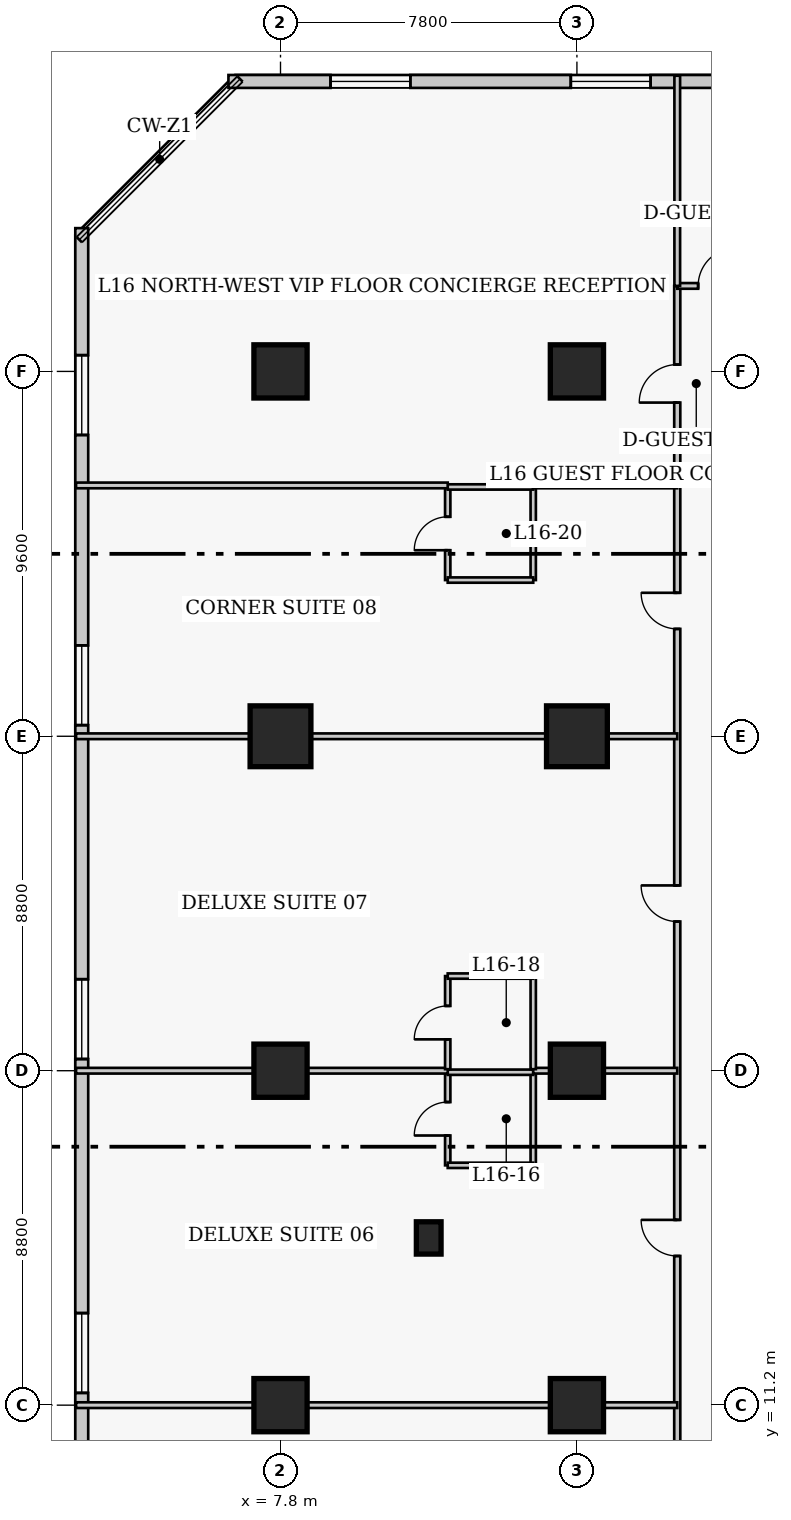
"""IFC4 building model, lengths in metres.
Left out: names, types, materials, properties, quantities, classifications, styles, units other than length and angle.
Written with IfcOpenShell. Run it as: python <this file> out.ifc"""

import sys

from ifc_helpers import new_model, si_unit, direction, frame, frame_2d, origin, origin_2d, place, context, subcontext, project, spatial, rectangle, extrude, element, fill, save


model = new_model("IFC4")
c1 = context("Model", 3, precision=1e-05, world=origin(), true_north=direction((0.0, 1.0)))
c2 = subcontext(c1, "Body", "Model", "MODEL_VIEW")
j1 = project(units=[si_unit("LENGTHUNIT", "METRE"), si_unit("PLANEANGLEUNIT", "RADIAN")], contexts=[c1])
p1 = place(None, origin())
s1 = spatial("IfcSite", under=j1, at=p1, CompositionType="ELEMENT")
p2 = place(p1, origin())
s2 = spatial("IfcBuilding", under=s1, at=p2, CompositionType="ELEMENT")
p3 = place(p2, frame((0.0, 0.0, 67.8)))
s3 = spatial("IfcBuildingStorey", under=s2, at=p3, CompositionType="ELEMENT", Elevation=67.8)
for number, where, z_axis, x_axis in (
    (1, (7.8, 11.2, 0.0), (0.0, 0.0, 1.0), (1.0, 0.0, 0.0)),
    (2, (7.8, 20.0, 0.0), (0.0, 0.0, 1.0), (1.0, 0.0, 0.0)),
):
    element("IfcColumn", number, at=place(p3, frame(where, z_axis=z_axis, x_axis=x_axis)), inside=s3, PredefinedType="COLUMN", context=c2, shape_type="SweptSolid", body=[
        extrude(rectangle(XDim=1.4, YDim=1.4, at=origin_2d()), origin(), (0.0, 0.0, 1.0), 3.8),
    ])
p4 = place(p3, frame((7.8, 28.8, 0.0), z_axis=(0.0, 0.0, 1.0), x_axis=(1.0, 0.0, 0.0)))
e3 = element("IfcColumn", 3, at=p4, inside=s3, PredefinedType="COLUMN", context=c2, shape_type="SweptSolid", body=[
    extrude(rectangle(XDim=1.6, YDim=1.6, at=origin_2d()), origin(), (0.0, 0.0, 1.0), 3.8),
])
for number, where, z_axis, x_axis in (
    (4, (7.8, 38.4, 0.0), (0.0, 0.0, 1.0), (1.0, 0.0, 0.0)),
    (5, (15.6, 11.2, 0.0), (0.0, 0.0, 1.0), (1.0, 0.0, 0.0)),
    (6, (15.6, 20.0, 0.0), (0.0, 0.0, 1.0), (1.0, 0.0, 0.0)),
):
    element("IfcColumn", number, at=place(p3, frame(where, z_axis=z_axis, x_axis=x_axis)), inside=s3, PredefinedType="COLUMN", context=c2, shape_type="SweptSolid", body=[
        extrude(rectangle(XDim=1.4, YDim=1.4, at=origin_2d()), origin(), (0.0, 0.0, 1.0), 3.8),
    ])
p5 = place(p3, frame((15.6, 28.8, 0.0), z_axis=(0.0, 0.0, 1.0), x_axis=(1.0, 0.0, 0.0)))
e7 = element("IfcColumn", 7, at=p5, inside=s3, PredefinedType="COLUMN", context=c2, shape_type="SweptSolid", body=[
    extrude(rectangle(XDim=1.6, YDim=1.6, at=origin_2d()), origin(), (0.0, 0.0, 1.0), 3.8),
])
p6 = place(p3, frame((15.6, 38.4, 0.0), z_axis=(0.0, 0.0, 1.0), x_axis=(1.0, 0.0, 0.0)))
e8 = element("IfcColumn", 8, at=p6, inside=s3, PredefinedType="COLUMN", context=c2, shape_type="SweptSolid", body=[
    extrude(rectangle(XDim=1.4, YDim=1.4, at=origin_2d()), origin(), (0.0, 0.0, 1.0), 3.8),
])
p7 = place(p3, frame((11.7, 15.6, 0.0), z_axis=(0.0, 0.0, 1.0), x_axis=(1.0, 0.0, 0.0)))
e9 = element("IfcColumn", 9, at=p7, inside=s3, PredefinedType="PILASTER", context=c2, shape_type="SweptSolid", body=[
    extrude(rectangle(XDim=0.65, YDim=0.85, at=origin_2d()), origin(), (0.0, 0.0, 1.0), 3.8),
])
p8 = place(p3, frame((36.32, 46.03, 0.0), z_axis=(0.0, 0.0, 1.0), x_axis=(-1.0, 0.0, 0.0)))
e10 = element("IfcWall", 10, at=p8, inside=s3, PredefinedType="SOLIDWALL", context=c2, shape_type="SweptSolid", body=[
    extrude(rectangle(XDim=29.89, YDim=0.34, at=frame_2d((14.945, 0.0))), origin(), (0.0, 0.0, 1.0), 3.54),
])
p9 = place(p8, frame((2.686, 0.0, 0.85)))
e11 = element("IfcOpeningElement", 11, at=p9, cuts=e10, PredefinedType="OPENING", context=c2, shape_type="SweptSolid", body=[
    extrude(rectangle(XDim=2.1, YDim=1.85, at=frame_2d((1.05, 0.925))), frame((0.0, 0.18, 0.0), z_axis=(0.0, -1.0, 0.0), x_axis=(1.0, 0.0, 0.0)), (0.0, 0.0, 1.0), 0.36),
])
p10 = place(p8, frame((10.159, 0.0, 0.85)))
e12 = element("IfcOpeningElement", 12, at=p10, cuts=e10, PredefinedType="OPENING", context=c2, shape_type="SweptSolid", body=[
    extrude(rectangle(XDim=2.1, YDim=1.85, at=frame_2d((1.05, 0.925))), frame((0.0, 0.18, 0.0), z_axis=(0.0, -1.0, 0.0), x_axis=(1.0, 0.0, 0.0)), (0.0, 0.0, 1.0), 0.36),
])
p11 = place(p8, frame((18.781, 0.0, 0.85)))
e13 = element("IfcOpeningElement", 13, at=p11, cuts=e10, PredefinedType="OPENING", context=c2, shape_type="SweptSolid", body=[
    extrude(rectangle(XDim=2.1, YDim=1.85, at=frame_2d((1.05, 0.925))), frame((0.0, 0.18, 0.0), z_axis=(0.0, -1.0, 0.0), x_axis=(1.0, 0.0, 0.0)), (0.0, 0.0, 1.0), 0.36),
])
p12 = place(p8, frame((25.104, 0.0, 0.85)))
e14 = element("IfcOpeningElement", 14, at=p12, cuts=e10, PredefinedType="OPENING", context=c2, shape_type="SweptSolid", body=[
    extrude(rectangle(XDim=2.1, YDim=1.85, at=frame_2d((1.05, 0.925))), frame((0.0, 0.18, 0.0), z_axis=(0.0, -1.0, 0.0), x_axis=(1.0, 0.0, 0.0)), (0.0, 0.0, 1.0), 0.36),
])
p13 = place(p3, frame((2.57, 42.17, 0.0), z_axis=(0.0, 0.0, 1.0), x_axis=(0.0, -1.0, 0.0)))
e15 = element("IfcWall", 15, at=p13, inside=s3, PredefinedType="SOLIDWALL", context=c2, shape_type="SweptSolid", body=[
    extrude(rectangle(XDim=35.14, YDim=0.34, at=frame_2d((17.57, 0.0))), origin(), (0.0, 0.0, 1.0), 3.54),
])
p14 = place(p13, frame((3.343, 0.0, 0.85)))
e16 = element("IfcOpeningElement", 16, at=p14, cuts=e15, PredefinedType="OPENING", context=c2, shape_type="SweptSolid", body=[
    extrude(rectangle(XDim=2.1, YDim=1.85, at=frame_2d((1.05, 0.925))), frame((0.0, 0.18, 0.0), z_axis=(0.0, -1.0, 0.0), x_axis=(1.0, 0.0, 0.0)), (0.0, 0.0, 1.0), 0.36),
])
p15 = place(p13, frame((10.978, 0.0, 0.85)))
e17 = element("IfcOpeningElement", 17, at=p15, cuts=e15, PredefinedType="OPENING", context=c2, shape_type="SweptSolid", body=[
    extrude(rectangle(XDim=2.1, YDim=1.85, at=frame_2d((1.05, 0.925))), frame((0.0, 0.18, 0.0), z_axis=(0.0, -1.0, 0.0), x_axis=(1.0, 0.0, 0.0)), (0.0, 0.0, 1.0), 0.36),
])
p16 = place(p13, frame((19.762, 0.0, 0.85)))
e18 = element("IfcOpeningElement", 18, at=p16, cuts=e15, PredefinedType="OPENING", context=c2, shape_type="SweptSolid", body=[
    extrude(rectangle(XDim=2.1, YDim=1.85, at=frame_2d((1.05, 0.925))), frame((0.0, 0.18, 0.0), z_axis=(0.0, -1.0, 0.0), x_axis=(1.0, 0.0, 0.0)), (0.0, 0.0, 1.0), 0.36),
])
p17 = place(p13, frame((28.548, 0.0, 0.85)))
e19 = element("IfcOpeningElement", 19, at=p17, cuts=e15, PredefinedType="OPENING", context=c2, shape_type="SweptSolid", body=[
    extrude(rectangle(XDim=2.1, YDim=1.85, at=frame_2d((1.05, 0.925))), frame((0.0, 0.18, 0.0), z_axis=(0.0, -1.0, 0.0), x_axis=(1.0, 0.0, 0.0)), (0.0, 0.0, 1.0), 0.36),
])
p18 = place(p3, frame((18.24, 5.05, 0.0), z_axis=(0.0, 0.0, 1.0), x_axis=(0.0, 1.0, 0.0)))
e20 = element("IfcWall", 20, at=p18, inside=s3, PredefinedType="PARTITIONING", context=c2, shape_type="SweptSolid", body=[
    extrude(rectangle(XDim=35.6, YDim=0.16, at=frame_2d((17.8, 0.0))), origin(), (0.0, 0.0, 1.0), 3.54),
])
p19 = place(p18, frame((2.6, 0.0, 0.0)))
e21 = element("IfcOpeningElement", 21, at=p19, cuts=e20, PredefinedType="OPENING", context=c2, shape_type="SweptSolid", body=[
    extrude(rectangle(XDim=0.95, YDim=2.1, at=frame_2d((0.475, 1.05))), frame((0.0, 0.09, 0.0), z_axis=(0.0, -1.0, 0.0), x_axis=(1.0, 0.0, 0.0)), (0.0, 0.0, 1.0), 0.18),
])
p20 = place(p18, frame((10.075, 0.0, 0.0)))
e22 = element("IfcOpeningElement", 22, at=p20, cuts=e20, PredefinedType="OPENING", context=c2, shape_type="SweptSolid", body=[
    extrude(rectangle(XDim=0.95, YDim=2.1, at=frame_2d((0.475, 1.05))), frame((0.0, 0.09, 0.0), z_axis=(0.0, -1.0, 0.0), x_axis=(1.0, 0.0, 0.0)), (0.0, 0.0, 1.0), 0.18),
])
p21 = place(p18, frame((18.875, 0.0, 0.0)))
e23 = element("IfcOpeningElement", 23, at=p21, cuts=e20, PredefinedType="OPENING", context=c2, shape_type="SweptSolid", body=[
    extrude(rectangle(XDim=0.95, YDim=2.1, at=frame_2d((0.475, 1.05))), frame((0.0, 0.09, 0.0), z_axis=(0.0, -1.0, 0.0), x_axis=(1.0, 0.0, 0.0)), (0.0, 0.0, 1.0), 0.18),
])
p22 = place(p18, frame((26.575, 0.0, 0.0)))
e24 = element("IfcOpeningElement", 24, at=p22, cuts=e20, PredefinedType="OPENING", context=c2, shape_type="SweptSolid", body=[
    extrude(rectangle(XDim=0.95, YDim=2.1, at=frame_2d((0.475, 1.05))), frame((0.0, 0.09, 0.0), z_axis=(0.0, -1.0, 0.0), x_axis=(1.0, 0.0, 0.0)), (0.0, 0.0, 1.0), 0.18),
])
p23 = place(p18, frame((32.53, 0.0, 0.0)))
e25 = element("IfcOpeningElement", 25, at=p23, cuts=e20, PredefinedType="OPENING", context=c2, shape_type="SweptSolid", body=[
    extrude(rectangle(XDim=1.0, YDim=2.15, at=frame_2d((0.5, 1.075))), frame((0.0, 0.09, 0.0), z_axis=(0.0, -1.0, 0.0), x_axis=(1.0, 0.0, 0.0)), (0.0, 0.0, 1.0), 0.18),
])
p24 = place(p3, frame((18.24, 40.65, 0.0), z_axis=(0.0, 0.0, 1.0), x_axis=(1.0, 0.0, 0.0)))
e26 = element("IfcWall", 26, at=p24, inside=s3, PredefinedType="PARTITIONING", context=c2, shape_type="SweptSolid", body=[
    extrude(rectangle(XDim=3.86, YDim=0.15, at=frame_2d((1.93, 0.0))), origin(), (0.0, 0.0, 1.0), 3.54),
])
p25 = place(p24, frame((0.55, 0.0, 0.0)))
e27 = element("IfcOpeningElement", 27, at=p25, cuts=e26, PredefinedType="OPENING", context=c2, shape_type="SweptSolid", body=[
    extrude(rectangle(XDim=1.0, YDim=2.15, at=frame_2d((0.5, 1.075))), frame((0.0, 0.085, 0.0), z_axis=(0.0, -1.0, 0.0), x_axis=(1.0, 0.0, 0.0)), (0.0, 0.0, 1.0), 0.17),
])
p26 = place(p3, frame((18.24, 40.65, 0.0), z_axis=(0.0, 0.0, 1.0), x_axis=(0.0, 1.0, 0.0)))
e28 = element("IfcWall", 28, at=p26, inside=s3, PredefinedType="PARTITIONING", context=c2, shape_type="SweptSolid", body=[
    extrude(rectangle(XDim=5.53, YDim=0.15, at=frame_2d((2.765, 0.0))), origin(), (0.0, 0.0, 1.0), 3.54),
])
p27 = place(p3, frame((2.42, 11.2, 0.0), z_axis=(0.0, 0.0, 1.0), x_axis=(1.0, 0.0, 0.0)))
e29 = element("IfcWall", 29, at=p27, inside=s3, PredefinedType="PARTITIONING", context=c2, shape_type="SweptSolid", body=[
    extrude(rectangle(XDim=15.82, YDim=0.15, at=frame_2d((7.91, 0.0))), origin(), (0.0, 0.0, 1.0), 2.593),
])
p28 = place(p3, frame((12.2, 17.51, 0.0), z_axis=(0.0, 0.0, 1.0), x_axis=(0.0, 1.0, 0.0)))
e30 = element("IfcWall", 30, at=p28, inside=s3, PredefinedType="PLUMBINGWALL", context=c2, shape_type="SweptSolid", body=[
    extrude(rectangle(XDim=2.45, YDim=0.14, at=frame_2d((1.225, 0.0))), origin(), (0.0, 0.0, 1.0), 3.54),
])
p29 = place(p28, frame((0.785, 0.0, 0.0)))
e31 = element("IfcOpeningElement", 31, at=p29, cuts=e30, PredefinedType="OPENING", context=c2, shape_type="SweptSolid", body=[
    extrude(rectangle(XDim=0.88, YDim=2.05, at=frame_2d((0.44, 1.025))), frame((0.0, 0.08, 0.0), z_axis=(0.0, -1.0, 0.0), x_axis=(1.0, 0.0, 0.0)), (0.0, 0.0, 1.0), 0.16),
])
p30 = place(p3, frame((14.45, 17.51, 0.0), z_axis=(0.0, 0.0, 1.0), x_axis=(0.0, 1.0, 0.0)))
e32 = element("IfcWall", 32, at=p30, inside=s3, PredefinedType="PLUMBINGWALL", context=c2, shape_type="SweptSolid", body=[
    extrude(rectangle(XDim=2.45, YDim=0.14, at=frame_2d((1.225, 0.0))), origin(), (0.0, 0.0, 1.0), 3.54),
])
p31 = place(p3, frame((12.2, 17.51, 0.0), z_axis=(0.0, 0.0, 1.0), x_axis=(1.0, 0.0, 0.0)))
e33 = element("IfcWall", 33, at=p31, inside=s3, PredefinedType="PLUMBINGWALL", context=c2, shape_type="SweptSolid", body=[
    extrude(rectangle(XDim=2.25, YDim=0.14, at=frame_2d((1.125, 0.0))), origin(), (0.0, 0.0, 1.0), 3.54),
])
p32 = place(p3, frame((12.2, 19.96, 0.0), z_axis=(0.0, 0.0, 1.0), x_axis=(1.0, 0.0, 0.0)))
e34 = element("IfcWall", 34, at=p32, inside=s3, PredefinedType="PLUMBINGWALL", context=c2, shape_type="SweptSolid", body=[
    extrude(rectangle(XDim=2.25, YDim=0.14, at=frame_2d((1.125, 0.0))), origin(), (0.0, 0.0, 1.0), 2.593),
])
p33 = place(p3, frame((2.42, 20.0, 0.0), z_axis=(0.0, 0.0, 1.0), x_axis=(1.0, 0.0, 0.0)))
e35 = element("IfcWall", 35, at=p33, inside=s3, PredefinedType="PARTITIONING", context=c2, shape_type="SweptSolid", body=[
    extrude(rectangle(XDim=9.78, YDim=0.15, at=frame_2d((4.89, 0.0))), origin(), (0.0, 0.0, 1.0), 2.593),
])
p34 = place(p3, frame((14.45, 20.0, 0.0), z_axis=(0.0, 0.0, 1.0), x_axis=(1.0, 0.0, 0.0)))
e36 = element("IfcWall", 36, at=p34, inside=s3, PredefinedType="PARTITIONING", context=c2, shape_type="SweptSolid", body=[
    extrude(rectangle(XDim=3.79, YDim=0.15, at=frame_2d((1.895, 0.0))), origin(), (0.0, 0.0, 1.0), 2.593),
])
p35 = place(p3, frame((12.2, 20.04, 0.0), z_axis=(0.0, 0.0, 1.0), x_axis=(0.0, 1.0, 0.0)))
e37 = element("IfcWall", 37, at=p35, inside=s3, PredefinedType="PLUMBINGWALL", context=c2, shape_type="SweptSolid", body=[
    extrude(rectangle(XDim=2.45, YDim=0.14, at=frame_2d((1.225, 0.0))), origin(), (0.0, 0.0, 1.0), 3.54),
])
p36 = place(p35, frame((0.785, 0.0, 0.0)))
e38 = element("IfcOpeningElement", 38, at=p36, cuts=e37, PredefinedType="OPENING", context=c2, shape_type="SweptSolid", body=[
    extrude(rectangle(XDim=0.88, YDim=2.05, at=frame_2d((0.44, 1.025))), frame((0.0, 0.08, 0.0), z_axis=(0.0, -1.0, 0.0), x_axis=(1.0, 0.0, 0.0)), (0.0, 0.0, 1.0), 0.16),
])
p37 = place(p3, frame((14.45, 20.04, 0.0), z_axis=(0.0, 0.0, 1.0), x_axis=(0.0, 1.0, 0.0)))
e39 = element("IfcWall", 39, at=p37, inside=s3, PredefinedType="PLUMBINGWALL", context=c2, shape_type="SweptSolid", body=[
    extrude(rectangle(XDim=2.45, YDim=0.14, at=frame_2d((1.225, 0.0))), origin(), (0.0, 0.0, 1.0), 3.54),
])
p38 = place(p3, frame((12.2, 22.49, 0.0), z_axis=(0.0, 0.0, 1.0), x_axis=(1.0, 0.0, 0.0)))
e40 = element("IfcWall", 40, at=p38, inside=s3, PredefinedType="PLUMBINGWALL", context=c2, shape_type="SweptSolid", body=[
    extrude(rectangle(XDim=2.25, YDim=0.14, at=frame_2d((1.125, 0.0))), origin(), (0.0, 0.0, 1.0), 3.54),
])
p39 = place(p3, frame((2.42, 28.8, 0.0), z_axis=(0.0, 0.0, 1.0), x_axis=(1.0, 0.0, 0.0)))
e41 = element("IfcWall", 41, at=p39, inside=s3, PredefinedType="PARTITIONING", context=c2, shape_type="SweptSolid", body=[
    extrude(rectangle(XDim=15.82, YDim=0.15, at=frame_2d((7.91, 0.0))), origin(), (0.0, 0.0, 1.0), 2.593),
])
p40 = place(p3, frame((12.2, 32.91, 0.0), z_axis=(0.0, 0.0, 1.0), x_axis=(0.0, 1.0, 0.0)))
e42 = element("IfcWall", 42, at=p40, inside=s3, PredefinedType="PLUMBINGWALL", context=c2, shape_type="SweptSolid", body=[
    extrude(rectangle(XDim=2.45, YDim=0.14, at=frame_2d((1.225, 0.0))), origin(), (0.0, 0.0, 1.0), 3.54),
])
p41 = place(p40, frame((0.785, 0.0, 0.0)))
e43 = element("IfcOpeningElement", 43, at=p41, cuts=e42, PredefinedType="OPENING", context=c2, shape_type="SweptSolid", body=[
    extrude(rectangle(XDim=0.88, YDim=2.05, at=frame_2d((0.44, 1.025))), frame((0.0, 0.08, 0.0), z_axis=(0.0, -1.0, 0.0), x_axis=(1.0, 0.0, 0.0)), (0.0, 0.0, 1.0), 0.16),
])
p42 = place(p3, frame((14.45, 32.91, 0.0), z_axis=(0.0, 0.0, 1.0), x_axis=(0.0, 1.0, 0.0)))
e44 = element("IfcWall", 44, at=p42, inside=s3, PredefinedType="PLUMBINGWALL", context=c2, shape_type="SweptSolid", body=[
    extrude(rectangle(XDim=2.45, YDim=0.14, at=frame_2d((1.225, 0.0))), origin(), (0.0, 0.0, 1.0), 3.54),
])
for number, where, z_axis, x_axis in (
    (45, (12.2, 32.91, 0.0), (0.0, 0.0, 1.0), (1.0, 0.0, 0.0)),
    (46, (12.2, 35.36, 0.0), (0.0, 0.0, 1.0), (1.0, 0.0, 0.0)),
):
    element("IfcWall", number, at=place(p3, frame(where, z_axis=z_axis, x_axis=x_axis)), inside=s3, PredefinedType="PLUMBINGWALL", context=c2, shape_type="SweptSolid", body=[
        extrude(rectangle(XDim=2.25, YDim=0.14, at=frame_2d((1.125, 0.0))), origin(), (0.0, 0.0, 1.0), 3.54),
    ])
p43 = place(p3, frame((2.42, 35.4, 0.0), z_axis=(0.0, 0.0, 1.0), x_axis=(1.0, 0.0, 0.0)))
e47 = element("IfcWall", 47, at=p43, inside=s3, PredefinedType="PARTITIONING", context=c2, shape_type="SweptSolid", body=[
    extrude(rectangle(XDim=9.78, YDim=0.15, at=frame_2d((4.89, 0.0))), origin(), (0.0, 0.0, 1.0), 3.54),
])
p44 = place(p3, frame((14.45, 35.4, 0.0), z_axis=(0.0, 0.0, 1.0), x_axis=(1.0, 0.0, 0.0)))
e48 = element("IfcWall", 48, at=p44, inside=s3, PredefinedType="PARTITIONING", context=c2, shape_type="SweptSolid", body=[
    extrude(rectangle(XDim=3.79, YDim=0.15, at=frame_2d((1.895, 0.0))), origin(), (0.0, 0.0, 1.0), 3.54),
])
p45 = place(p11, origin())
e49 = element("IfcWindow", 49, at=p45, inside=s3, PartitioningType="SINGLE_PANEL", PredefinedType="WINDOW", context=c2, shape_type="SweptSolid", body=[
    extrude(rectangle(XDim=2.1, YDim=1.85, at=frame_2d((1.05, 0.925))), frame((0.0, 0.03, 0.0), z_axis=(0.0, -1.0, 0.0), x_axis=(1.0, 0.0, 0.0)), (0.0, 0.0, 1.0), 0.06),
])
fill(e13, e49)
p46 = place(p12, origin())
e50 = element("IfcWindow", 50, at=p46, inside=s3, PartitioningType="SINGLE_PANEL", PredefinedType="WINDOW", context=c2, shape_type="SweptSolid", body=[
    extrude(rectangle(XDim=2.1, YDim=1.85, at=frame_2d((1.05, 0.925))), frame((0.0, 0.03, 0.0), z_axis=(0.0, -1.0, 0.0), x_axis=(1.0, 0.0, 0.0)), (0.0, 0.0, 1.0), 0.06),
])
fill(e14, e50)
p47 = place(p14, origin())
e51 = element("IfcWindow", 51, at=p47, inside=s3, PartitioningType="SINGLE_PANEL", PredefinedType="WINDOW", context=c2, shape_type="SweptSolid", body=[
    extrude(rectangle(XDim=2.1, YDim=1.85, at=frame_2d((1.05, 0.925))), frame((0.0, 0.03, 0.0), z_axis=(0.0, -1.0, 0.0), x_axis=(1.0, 0.0, 0.0)), (0.0, 0.0, 1.0), 0.06),
])
fill(e16, e51)
p48 = place(p15, origin())
e52 = element("IfcWindow", 52, at=p48, inside=s3, PartitioningType="SINGLE_PANEL", PredefinedType="WINDOW", context=c2, shape_type="SweptSolid", body=[
    extrude(rectangle(XDim=2.1, YDim=1.85, at=frame_2d((1.05, 0.925))), frame((0.0, 0.03, 0.0), z_axis=(0.0, -1.0, 0.0), x_axis=(1.0, 0.0, 0.0)), (0.0, 0.0, 1.0), 0.06),
])
fill(e17, e52)
p49 = place(p16, origin())
e53 = element("IfcWindow", 53, at=p49, inside=s3, PartitioningType="SINGLE_PANEL", PredefinedType="WINDOW", context=c2, shape_type="SweptSolid", body=[
    extrude(rectangle(XDim=2.1, YDim=1.85, at=frame_2d((1.05, 0.925))), frame((0.0, 0.03, 0.0), z_axis=(0.0, -1.0, 0.0), x_axis=(1.0, 0.0, 0.0)), (0.0, 0.0, 1.0), 0.06),
])
fill(e18, e53)
p50 = place(p17, origin())
e54 = element("IfcWindow", 54, at=p50, inside=s3, PartitioningType="SINGLE_PANEL", PredefinedType="WINDOW", context=c2, shape_type="SweptSolid", body=[
    extrude(rectangle(XDim=2.1, YDim=1.85, at=frame_2d((1.05, 0.925))), frame((0.0, 0.03, 0.0), z_axis=(0.0, -1.0, 0.0), x_axis=(1.0, 0.0, 0.0)), (0.0, 0.0, 1.0), 0.06),
])
fill(e19, e54)
p51 = place(p25, origin())
e55 = element("IfcDoor", 55, at=p51, inside=s3, OperationType="SINGLE_SWING_RIGHT", PredefinedType="DOOR", context=c2, shape_type="SweptSolid", body=[
    extrude(rectangle(XDim=1.0, YDim=2.15, at=frame_2d((0.5, 1.075))), frame((0.0, 0.025, 0.0), z_axis=(0.0, -1.0, 0.0), x_axis=(1.0, 0.0, 0.0)), (0.0, 0.0, 1.0), 0.05),
])
fill(e27, e55)
p52 = place(p29, origin())
e56 = element("IfcDoor", 56, at=p52, inside=s3, OperationType="SINGLE_SWING_LEFT", PredefinedType="DOOR", context=c2, shape_type="SweptSolid", body=[
    extrude(rectangle(XDim=0.88, YDim=2.05, at=frame_2d((0.44, 1.025))), frame((0.0, 0.025, 0.0), z_axis=(0.0, -1.0, 0.0), x_axis=(1.0, 0.0, 0.0)), (0.0, 0.0, 1.0), 0.05),
])
fill(e31, e56)
p53 = place(p20, origin())
e57 = element("IfcDoor", 57, at=p53, inside=s3, OperationType="SINGLE_SWING_RIGHT", PredefinedType="DOOR", context=c2, shape_type="SweptSolid", body=[
    extrude(rectangle(XDim=0.95, YDim=2.1, at=frame_2d((0.475, 1.05))), frame((0.0, 0.025, 0.0), z_axis=(0.0, -1.0, 0.0), x_axis=(1.0, 0.0, 0.0)), (0.0, 0.0, 1.0), 0.05),
])
fill(e22, e57)
p54 = place(p36, origin())
e58 = element("IfcDoor", 58, at=p54, inside=s3, OperationType="SINGLE_SWING_LEFT", PredefinedType="DOOR", context=c2, shape_type="SweptSolid", body=[
    extrude(rectangle(XDim=0.88, YDim=2.05, at=frame_2d((0.44, 1.025))), frame((0.0, 0.025, 0.0), z_axis=(0.0, -1.0, 0.0), x_axis=(1.0, 0.0, 0.0)), (0.0, 0.0, 1.0), 0.05),
])
fill(e38, e58)
p55 = place(p21, origin())
e59 = element("IfcDoor", 59, at=p55, inside=s3, OperationType="SINGLE_SWING_RIGHT", PredefinedType="DOOR", context=c2, shape_type="SweptSolid", body=[
    extrude(rectangle(XDim=0.95, YDim=2.1, at=frame_2d((0.475, 1.05))), frame((0.0, 0.025, 0.0), z_axis=(0.0, -1.0, 0.0), x_axis=(1.0, 0.0, 0.0)), (0.0, 0.0, 1.0), 0.05),
])
fill(e23, e59)
p56 = place(p41, origin())
e60 = element("IfcDoor", 60, at=p56, inside=s3, OperationType="SINGLE_SWING_LEFT", PredefinedType="DOOR", context=c2, shape_type="SweptSolid", body=[
    extrude(rectangle(XDim=0.88, YDim=2.05, at=frame_2d((0.44, 1.025))), frame((0.0, 0.025, 0.0), z_axis=(0.0, -1.0, 0.0), x_axis=(1.0, 0.0, 0.0)), (0.0, 0.0, 1.0), 0.05),
])
fill(e43, e60)
p57 = place(p22, origin())
e61 = element("IfcDoor", 61, at=p57, inside=s3, OperationType="SINGLE_SWING_RIGHT", PredefinedType="DOOR", context=c2, shape_type="SweptSolid", body=[
    extrude(rectangle(XDim=0.95, YDim=2.1, at=frame_2d((0.475, 1.05))), frame((0.0, 0.025, 0.0), z_axis=(0.0, -1.0, 0.0), x_axis=(1.0, 0.0, 0.0)), (0.0, 0.0, 1.0), 0.05),
])
fill(e24, e61)
p58 = place(p23, origin())
e62 = element("IfcDoor", 62, at=p58, inside=s3, OperationType="SINGLE_SWING_LEFT", PredefinedType="DOOR", context=c2, shape_type="SweptSolid", body=[
    extrude(rectangle(XDim=1.0, YDim=2.15, at=frame_2d((0.5, 1.075))), frame((0.0, 0.025, 0.0), z_axis=(0.0, -1.0, 0.0), x_axis=(1.0, 0.0, 0.0)), (0.0, 0.0, 1.0), 0.05),
])
fill(e25, e62)
save(model, sys.argv[1])
